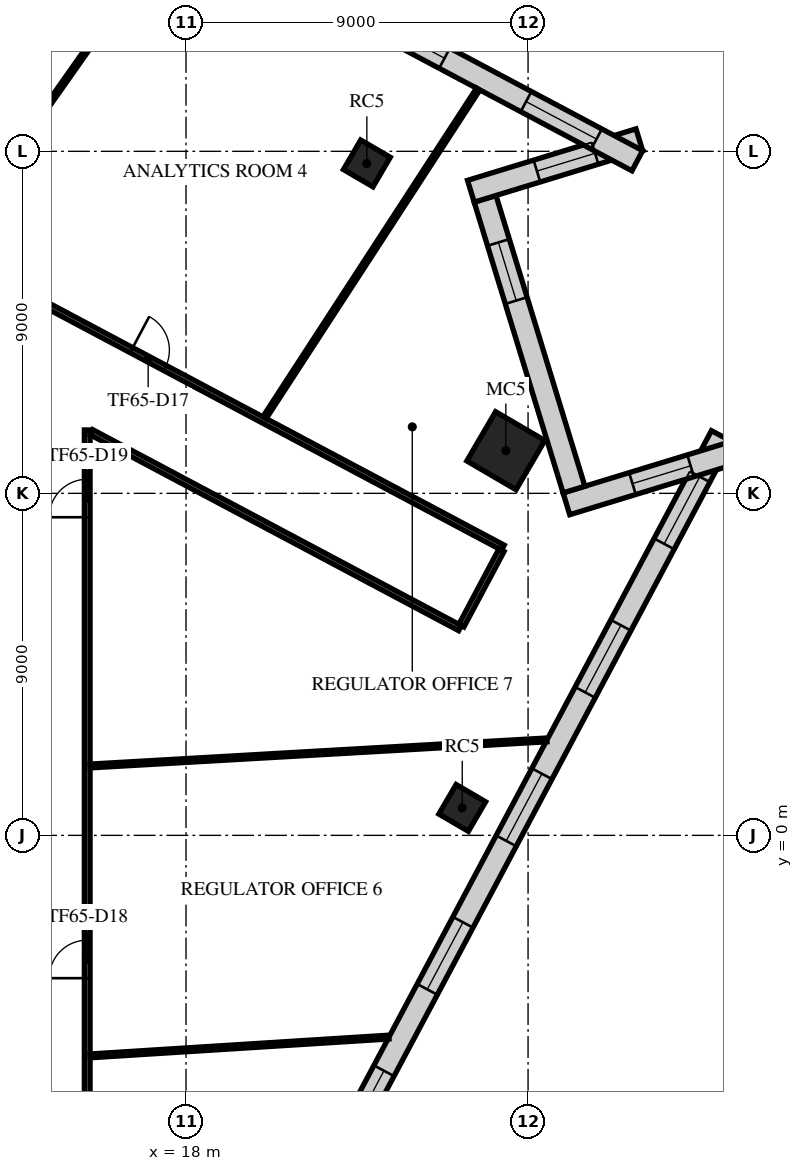
"""IFC4 building model, lengths in metres.
Left out: names, types, materials, properties, quantities, classifications, styles, units other than length and angle.
Written with IfcOpenShell. Run it as: python <this file> out.ifc"""

import sys

from ifc_helpers import new_model, si_unit, direction, frame, frame_2d, origin, origin_2d, place, context, subcontext, project, spatial, rectangle, extrude, element, fill, save


model = new_model("IFC4")
c1 = context("Model", 3, precision=1e-05, world=origin(), true_north=direction((0.0, 1.0)))
c2 = subcontext(c1, "Body", "Model", "MODEL_VIEW")
j1 = project(units=[si_unit("LENGTHUNIT", "METRE"), si_unit("PLANEANGLEUNIT", "RADIAN")], contexts=[c1])
p1 = place(None, origin())
s1 = spatial("IfcSite", under=j1, at=p1, CompositionType="ELEMENT")
p2 = place(p1, origin())
s2 = spatial("IfcBuilding", under=s1, at=p2, CompositionType="ELEMENT")
p3 = place(p2, frame((0.0, 0.0, 274.9)))
s3 = spatial("IfcBuildingStorey", under=s2, at=p3, CompositionType="ELEMENT", Elevation=274.9)
p4 = place(p3, frame((25.268, 0.722, 0.0), z_axis=(0.0, 0.0, 1.0), x_axis=(0.504643651291, 0.863327739165, 0.0)))
e1 = element("IfcColumn", 1, at=p4, inside=s3, PredefinedType="COLUMN", context=c2, shape_type="SweptSolid", body=[
    extrude(rectangle(XDim=0.9, YDim=0.9, at=origin_2d()), origin(), (0.0, 0.0, 1.0), 4.0),
])
p5 = place(p3, frame((26.415, 10.122, 0.0), z_axis=(0.0, 0.0, 1.0), x_axis=(0.504643651291, 0.863327739165, 0.0)))
e2 = element("IfcColumn", 2, at=p5, inside=s3, PredefinedType="COLUMN", context=c2, shape_type="SweptSolid", body=[
    extrude(rectangle(XDim=1.5, YDim=1.5, at=origin_2d()), origin(), (0.0, 0.0, 1.0), 4.0),
])
p6 = place(p3, frame((22.758, 17.682, 0.0), z_axis=(0.0, 0.0, 1.0), x_axis=(0.504643651291, 0.863327739165, 0.0)))
e3 = element("IfcColumn", 3, at=p6, inside=s3, PredefinedType="COLUMN", context=c2, shape_type="SweptSolid", body=[
    extrude(rectangle(XDim=0.9, YDim=0.9, at=origin_2d()), origin(), (0.0, 0.0, 1.0), 4.0),
])
p7 = place(p3, frame((9.233, -32.479, 0.0), z_axis=(0.0, 0.0, 1.0), x_axis=(0.469468429065, 0.882949259081, 0.0)))
e4 = element("IfcWall", 4, at=p7, inside=s3, PredefinedType="STANDARD", context=c2, shape_type="SweptSolid", body=[
    extrude(rectangle(XDim=48.686, YDim=0.6, at=frame_2d((24.343, 0.0))), origin(), (0.0, 0.0, 1.0), 3.64),
])
p8 = place(p7, frame((1.213, 0.0, 0.9)))
e5 = element("IfcOpeningElement", 5, at=p8, cuts=e4, PredefinedType="OPENING", context=c2, shape_type="SweptSolid", body=[
    extrude(rectangle(XDim=2.0, YDim=2.1, at=frame_2d((1.0, 1.05))), frame((0.0, 0.31, 0.0), z_axis=(0.0, -1.0, 0.0), x_axis=(1.0, 0.0, 0.0)), (0.0, 0.0, 1.0), 0.62),
])
p9 = place(p7, frame((5.639, 0.0, 0.9)))
e6 = element("IfcOpeningElement", 6, at=p9, cuts=e4, PredefinedType="OPENING", context=c2, shape_type="SweptSolid", body=[
    extrude(rectangle(XDim=2.0, YDim=2.1, at=frame_2d((1.0, 1.05))), frame((0.0, 0.31, 0.0), z_axis=(0.0, -1.0, 0.0), x_axis=(1.0, 0.0, 0.0)), (0.0, 0.0, 1.0), 0.62),
])
p10 = place(p7, frame((10.065, 0.0, 0.9)))
e7 = element("IfcOpeningElement", 7, at=p10, cuts=e4, PredefinedType="OPENING", context=c2, shape_type="SweptSolid", body=[
    extrude(rectangle(XDim=2.0, YDim=2.1, at=frame_2d((1.0, 1.05))), frame((0.0, 0.31, 0.0), z_axis=(0.0, -1.0, 0.0), x_axis=(1.0, 0.0, 0.0)), (0.0, 0.0, 1.0), 0.62),
])
p11 = place(p7, frame((14.491, 0.0, 0.9)))
e8 = element("IfcOpeningElement", 8, at=p11, cuts=e4, PredefinedType="OPENING", context=c2, shape_type="SweptSolid", body=[
    extrude(rectangle(XDim=2.0, YDim=2.1, at=frame_2d((1.0, 1.05))), frame((0.0, 0.31, 0.0), z_axis=(0.0, -1.0, 0.0), x_axis=(1.0, 0.0, 0.0)), (0.0, 0.0, 1.0), 0.62),
])
p12 = place(p7, frame((18.917, 0.0, 0.9)))
e9 = element("IfcOpeningElement", 9, at=p12, cuts=e4, PredefinedType="OPENING", context=c2, shape_type="SweptSolid", body=[
    extrude(rectangle(XDim=2.0, YDim=2.1, at=frame_2d((1.0, 1.05))), frame((0.0, 0.31, 0.0), z_axis=(0.0, -1.0, 0.0), x_axis=(1.0, 0.0, 0.0)), (0.0, 0.0, 1.0), 0.62),
])
p13 = place(p7, frame((23.343, 0.0, 0.9)))
e10 = element("IfcOpeningElement", 10, at=p13, cuts=e4, PredefinedType="OPENING", context=c2, shape_type="SweptSolid", body=[
    extrude(rectangle(XDim=2.0, YDim=2.1, at=frame_2d((1.0, 1.05))), frame((0.0, 0.31, 0.0), z_axis=(0.0, -1.0, 0.0), x_axis=(1.0, 0.0, 0.0)), (0.0, 0.0, 1.0), 0.62),
])
p14 = place(p7, frame((27.769, 0.0, 0.9)))
e11 = element("IfcOpeningElement", 11, at=p14, cuts=e4, PredefinedType="OPENING", context=c2, shape_type="SweptSolid", body=[
    extrude(rectangle(XDim=2.0, YDim=2.1, at=frame_2d((1.0, 1.05))), frame((0.0, 0.31, 0.0), z_axis=(0.0, -1.0, 0.0), x_axis=(1.0, 0.0, 0.0)), (0.0, 0.0, 1.0), 0.62),
])
p15 = place(p7, frame((32.195, 0.0, 0.9)))
e12 = element("IfcOpeningElement", 12, at=p15, cuts=e4, PredefinedType="OPENING", context=c2, shape_type="SweptSolid", body=[
    extrude(rectangle(XDim=2.0, YDim=2.1, at=frame_2d((1.0, 1.05))), frame((0.0, 0.31, 0.0), z_axis=(0.0, -1.0, 0.0), x_axis=(1.0, 0.0, 0.0)), (0.0, 0.0, 1.0), 0.62),
])
p16 = place(p7, frame((36.621, 0.0, 0.9)))
e13 = element("IfcOpeningElement", 13, at=p16, cuts=e4, PredefinedType="OPENING", context=c2, shape_type="SweptSolid", body=[
    extrude(rectangle(XDim=2.0, YDim=2.1, at=frame_2d((1.0, 1.05))), frame((0.0, 0.31, 0.0), z_axis=(0.0, -1.0, 0.0), x_axis=(1.0, 0.0, 0.0)), (0.0, 0.0, 1.0), 0.62),
])
p17 = place(p7, frame((41.047, 0.0, 0.9)))
e14 = element("IfcOpeningElement", 14, at=p17, cuts=e4, PredefinedType="OPENING", context=c2, shape_type="SweptSolid", body=[
    extrude(rectangle(XDim=2.0, YDim=2.1, at=frame_2d((1.0, 1.05))), frame((0.0, 0.31, 0.0), z_axis=(0.0, -1.0, 0.0), x_axis=(1.0, 0.0, 0.0)), (0.0, 0.0, 1.0), 0.62),
])
p18 = place(p7, frame((45.473, 0.0, 0.9)))
e15 = element("IfcOpeningElement", 15, at=p18, cuts=e4, PredefinedType="OPENING", context=c2, shape_type="SweptSolid", body=[
    extrude(rectangle(XDim=2.0, YDim=2.1, at=frame_2d((1.0, 1.05))), frame((0.0, 0.31, 0.0), z_axis=(0.0, -1.0, 0.0), x_axis=(1.0, 0.0, 0.0)), (0.0, 0.0, 1.0), 0.62),
])
p19 = place(p3, frame((32.442, 10.08, 0.0), z_axis=(0.0, 0.0, 1.0), x_axis=(-0.956306994041, -0.2923643842, 0.0)))
e16 = element("IfcWall", 16, at=p19, inside=s3, PredefinedType="STANDARD", context=c2, shape_type="SweptSolid", body=[
    extrude(rectangle(XDim=4.635, YDim=0.6, at=frame_2d((2.318, 0.0))), origin(), (0.0, 0.0, 1.0), 3.64),
])
p20 = place(p19, frame((1.218, 0.0, 0.9)))
e17 = element("IfcOpeningElement", 17, at=p20, cuts=e16, PredefinedType="OPENING", context=c2, shape_type="SweptSolid", body=[
    extrude(rectangle(XDim=1.6, YDim=2.1, at=frame_2d((0.8, 1.05))), frame((0.0, 0.31, 0.0), z_axis=(0.0, -1.0, 0.0), x_axis=(1.0, 0.0, 0.0)), (0.0, 0.0, 1.0), 0.62),
])
p21 = place(p3, frame((28.208, 9.1, 0.0), z_axis=(0.0, 0.0, 1.0), x_axis=(-0.292389102139, 0.956299436866, 0.0)))
e18 = element("IfcWall", 18, at=p21, inside=s3, PredefinedType="STANDARD", context=c2, shape_type="SweptSolid", body=[
    extrude(rectangle(XDim=8.0, YDim=0.6, at=frame_2d((4.0, 0.0))), origin(), (0.0, 0.0, 1.0), 3.64),
])
p22 = place(p21, frame((5.2, 0.0, 0.9)))
e19 = element("IfcOpeningElement", 19, at=p22, cuts=e18, PredefinedType="OPENING", context=c2, shape_type="SweptSolid", body=[
    extrude(rectangle(XDim=1.6, YDim=2.1, at=frame_2d((0.8, 1.05))), frame((0.0, 0.31, 0.0), z_axis=(0.0, -1.0, 0.0), x_axis=(1.0, 0.0, 0.0)), (0.0, 0.0, 1.0), 0.62),
])
p23 = place(p3, frame((25.495, 16.949, 0.0), z_axis=(0.0, 0.0, 1.0), x_axis=(0.956292267386, 0.292412549899, 0.0)))
e20 = element("IfcWall", 20, at=p23, inside=s3, PredefinedType="STANDARD", context=c2, shape_type="SweptSolid", body=[
    extrude(rectangle(XDim=4.635, YDim=0.6, at=frame_2d((2.318, 0.0))), origin(), (0.0, 0.0, 1.0), 3.64),
])
p24 = place(p23, frame((1.818, 0.0, 0.9)))
e21 = element("IfcOpeningElement", 21, at=p24, cuts=e20, PredefinedType="OPENING", context=c2, shape_type="SweptSolid", body=[
    extrude(rectangle(XDim=1.6, YDim=2.1, at=frame_2d((0.8, 1.05))), frame((0.0, 0.31, 0.0), z_axis=(0.0, -1.0, 0.0), x_axis=(1.0, 0.0, 0.0)), (0.0, 0.0, 1.0), 0.62),
])
p25 = place(p3, frame((29.875, 17.753, 0.0), z_axis=(0.0, 0.0, 1.0), x_axis=(-0.88294707281, 0.469472540854, 0.0)))
e22 = element("IfcWall", 22, at=p25, inside=s3, PredefinedType="STANDARD", context=c2, shape_type="SweptSolid", body=[
    extrude(rectangle(XDim=36.243, YDim=0.6, at=frame_2d((18.122, 0.0))), origin(), (0.0, 0.0, 1.0), 3.64),
])
p26 = place(p25, frame((1.215, 0.0, 0.9)))
e23 = element("IfcOpeningElement", 23, at=p26, cuts=e22, PredefinedType="OPENING", context=c2, shape_type="SweptSolid", body=[
    extrude(rectangle(XDim=2.1, YDim=2.1, at=frame_2d((1.05, 1.05))), frame((0.0, 0.31, 0.0), z_axis=(0.0, -1.0, 0.0), x_axis=(1.0, 0.0, 0.0)), (0.0, 0.0, 1.0), 0.62),
])
p27 = place(p25, frame((5.746, 0.0, 0.9)))
e24 = element("IfcOpeningElement", 24, at=p27, cuts=e22, PredefinedType="OPENING", context=c2, shape_type="SweptSolid", body=[
    extrude(rectangle(XDim=2.1, YDim=2.1, at=frame_2d((1.05, 1.05))), frame((0.0, 0.31, 0.0), z_axis=(0.0, -1.0, 0.0), x_axis=(1.0, 0.0, 0.0)), (0.0, 0.0, 1.0), 0.62),
])
p28 = place(p25, frame((10.276, 0.0, 0.9)))
e25 = element("IfcOpeningElement", 25, at=p28, cuts=e22, PredefinedType="OPENING", context=c2, shape_type="SweptSolid", body=[
    extrude(rectangle(XDim=2.1, YDim=2.1, at=frame_2d((1.05, 1.05))), frame((0.0, 0.31, 0.0), z_axis=(0.0, -1.0, 0.0), x_axis=(1.0, 0.0, 0.0)), (0.0, 0.0, 1.0), 0.62),
])
p29 = place(p25, frame((14.806, 0.0, 0.9)))
e26 = element("IfcOpeningElement", 26, at=p29, cuts=e22, PredefinedType="OPENING", context=c2, shape_type="SweptSolid", body=[
    extrude(rectangle(XDim=2.1, YDim=2.1, at=frame_2d((1.05, 1.05))), frame((0.0, 0.31, 0.0), z_axis=(0.0, -1.0, 0.0), x_axis=(1.0, 0.0, 0.0)), (0.0, 0.0, 1.0), 0.62),
])
p30 = place(p25, frame((19.337, 0.0, 0.9)))
e27 = element("IfcOpeningElement", 27, at=p30, cuts=e22, PredefinedType="OPENING", context=c2, shape_type="SweptSolid", body=[
    extrude(rectangle(XDim=2.1, YDim=2.1, at=frame_2d((1.05, 1.05))), frame((0.0, 0.31, 0.0), z_axis=(0.0, -1.0, 0.0), x_axis=(1.0, 0.0, 0.0)), (0.0, 0.0, 1.0), 0.62),
])
p31 = place(p25, frame((23.867, 0.0, 0.9)))
e28 = element("IfcOpeningElement", 28, at=p31, cuts=e22, PredefinedType="OPENING", context=c2, shape_type="SweptSolid", body=[
    extrude(rectangle(XDim=2.1, YDim=2.1, at=frame_2d((1.05, 1.05))), frame((0.0, 0.31, 0.0), z_axis=(0.0, -1.0, 0.0), x_axis=(1.0, 0.0, 0.0)), (0.0, 0.0, 1.0), 0.62),
])
p32 = place(p25, frame((28.398, 0.0, 0.9)))
e29 = element("IfcOpeningElement", 29, at=p32, cuts=e22, PredefinedType="OPENING", context=c2, shape_type="SweptSolid", body=[
    extrude(rectangle(XDim=2.1, YDim=2.1, at=frame_2d((1.05, 1.05))), frame((0.0, 0.31, 0.0), z_axis=(0.0, -1.0, 0.0), x_axis=(1.0, 0.0, 0.0)), (0.0, 0.0, 1.0), 0.62),
])
p33 = place(p25, frame((32.928, 0.0, 0.9)))
e30 = element("IfcOpeningElement", 30, at=p33, cuts=e22, PredefinedType="OPENING", context=c2, shape_type="SweptSolid", body=[
    extrude(rectangle(XDim=2.1, YDim=2.1, at=frame_2d((1.05, 1.05))), frame((0.0, 0.31, 0.0), z_axis=(0.0, -1.0, 0.0), x_axis=(1.0, 0.0, 0.0)), (0.0, 0.0, 1.0), 0.62),
])
p34 = place(p3, frame((-8.385, 26.033, 0.0), z_axis=(0.0, 0.0, 1.0), x_axis=(0.882949433839, -0.46946810039, 0.0)))
e31 = element("IfcWall", 31, at=p34, inside=s3, PredefinedType="PARTITIONING", context=c2, shape_type="SweptSolid", body=[
    extrude(rectangle(XDim=39.325, YDim=0.15, at=frame_2d((19.662, 0.0))), origin(), (0.0, 0.0, 1.0), 3.04),
])
p35 = place(p34, frame((10.622, 0.0, 0.0)))
e32 = element("IfcOpeningElement", 32, at=p35, cuts=e31, PredefinedType="OPENING", context=c2, shape_type="SweptSolid", body=[
    extrude(rectangle(XDim=1.0, YDim=2.1, at=frame_2d((0.5, 1.05))), frame((0.0, 0.085, 0.0), z_axis=(0.0, -1.0, 0.0), x_axis=(1.0, 0.0, 0.0)), (0.0, 0.0, 1.0), 0.17),
])
p36 = place(p34, frame((16.615, 0.0, 0.0)))
e33 = element("IfcOpeningElement", 33, at=p36, cuts=e31, PredefinedType="OPENING", context=c2, shape_type="SweptSolid", body=[
    extrude(rectangle(XDim=1.0, YDim=2.1, at=frame_2d((0.5, 1.05))), frame((0.0, 0.085, 0.0), z_axis=(0.0, -1.0, 0.0), x_axis=(1.0, 0.0, 0.0)), (0.0, 0.0, 1.0), 0.17),
])
p37 = place(p34, frame((28.254, 0.0, 0.0)))
e34 = element("IfcOpeningElement", 34, at=p37, cuts=e31, PredefinedType="OPENING", context=c2, shape_type="SweptSolid", body=[
    extrude(rectangle(XDim=1.0, YDim=2.1, at=frame_2d((0.5, 1.05))), frame((0.0, 0.085, 0.0), z_axis=(0.0, -1.0, 0.0), x_axis=(1.0, 0.0, 0.0)), (0.0, 0.0, 1.0), 0.17),
])
p38 = place(p3, frame((15.4, -15.325, 0.0), z_axis=(0.0, 0.0, 1.0), x_axis=(0.0, 1.0, 0.0)))
e35 = element("IfcWall", 35, at=p38, inside=s3, PredefinedType="PARTITIONING", context=c2, shape_type="SweptSolid", body=[
    extrude(rectangle(XDim=25.993, YDim=0.15, at=frame_2d((12.997, 0.0))), origin(), (0.0, 0.0, 1.0), 3.24),
])
p39 = place(p38, frame((0.8, 0.0, 0.0)))
e36 = element("IfcOpeningElement", 36, at=p39, cuts=e35, PredefinedType="OPENING", context=c2, shape_type="SweptSolid", body=[
    extrude(rectangle(XDim=1.8, YDim=2.1, at=frame_2d((0.9, 1.05))), frame((0.0, 0.085, 0.0), z_axis=(0.0, -1.0, 0.0), x_axis=(1.0, 0.0, 0.0)), (0.0, 0.0, 1.0), 0.17),
])
p40 = place(p38, frame((11.567, 0.0, 0.0)))
e37 = element("IfcOpeningElement", 37, at=p40, cuts=e35, PredefinedType="OPENING", context=c2, shape_type="SweptSolid", body=[
    extrude(rectangle(XDim=1.0, YDim=2.1, at=frame_2d((0.5, 1.05))), frame((0.0, 0.085, 0.0), z_axis=(0.0, -1.0, 0.0), x_axis=(1.0, 0.0, 0.0)), (0.0, 0.0, 1.0), 0.17),
])
p41 = place(p38, frame((23.696, 0.0, 0.0)))
e38 = element("IfcOpeningElement", 38, at=p41, cuts=e35, PredefinedType="OPENING", context=c2, shape_type="SweptSolid", body=[
    extrude(rectangle(XDim=1.0, YDim=2.1, at=frame_2d((0.5, 1.05))), frame((0.0, 0.085, 0.0), z_axis=(0.0, -1.0, 0.0), x_axis=(1.0, 0.0, 0.0)), (0.0, 0.0, 1.0), 0.17),
])
p42 = place(p3, frame((15.51, 10.609, 0.0), z_axis=(0.0, 0.0, 1.0), x_axis=(0.882945895242, -0.469474755525, 0.0)))
e39 = element("IfcWall", 39, at=p42, inside=s3, PredefinedType="PARTITIONING", context=c2, shape_type="SweptSolid", body=[
    extrude(rectangle(XDim=10.986, YDim=0.15, at=frame_2d((5.493, 0.0))), origin(), (0.0, 0.0, 1.0), 3.24),
])
p43 = place(p3, frame((25.245, 5.518, 0.0), z_axis=(0.0, 0.0, 1.0), x_axis=(0.469596777995, 0.882881003361, 0.0)))
e40 = element("IfcWall", 40, at=p43, inside=s3, PredefinedType="PARTITIONING", context=c2, shape_type="SweptSolid", body=[
    extrude(rectangle(XDim=2.25, YDim=0.15, at=frame_2d((1.125, 0.0))), origin(), (0.0, 0.0, 1.0), 3.04),
])
p44 = place(p3, frame((11.709, 15.441, 0.0), z_axis=(0.0, 0.0, 1.0), x_axis=(0.575721307139, 0.817645997058, 0.0)))
e41 = element("IfcWall", 41, at=p44, inside=s3, PredefinedType="PARTITIONING", context=c2, shape_type="SweptSolid", body=[
    extrude(rectangle(XDim=10.348, YDim=0.1, at=frame_2d((5.174, 0.0))), origin(), (0.0, 0.0, 1.0), 3.04),
])
p45 = place(p3, frame((15.478, -5.803, 0.0), z_axis=(0.0, 0.0, 1.0), x_axis=(0.9980255857, 0.062808680043, 0.0)))
e42 = element("IfcWall", 42, at=p45, inside=s3, PredefinedType="PARTITIONING", context=c2, shape_type="SweptSolid", body=[
    extrude(rectangle(XDim=7.875, YDim=0.1, at=frame_2d((3.938, 0.0))), origin(), (0.0, 0.0, 1.0), 3.04),
])
p46 = place(p3, frame((15.478, 1.825, 0.0), z_axis=(0.0, 0.0, 1.0), x_axis=(0.998373479071, 0.057012246819, 0.0)))
e43 = element("IfcWall", 43, at=p46, inside=s3, PredefinedType="PARTITIONING", context=c2, shape_type="SweptSolid", body=[
    extrude(rectangle(XDim=12.037, YDim=0.1, at=frame_2d((6.019, 0.0))), origin(), (0.0, 0.0, 1.0), 3.04),
])
p47 = place(p3, frame((20.067, 10.995, 0.0), z_axis=(0.0, 0.0, 1.0), x_axis=(0.545104885897, 0.838367856834, 0.0)))
e44 = element("IfcWall", 44, at=p47, inside=s3, PredefinedType="PARTITIONING", context=c2, shape_type="SweptSolid", body=[
    extrude(rectangle(XDim=10.309, YDim=0.1, at=frame_2d((5.154, 0.0))), origin(), (0.0, 0.0, 1.0), 3.04),
])
p48 = place(p14, origin())
e45 = element("IfcWindow", 45, at=p48, inside=s3, PartitioningType="SINGLE_PANEL", PredefinedType="WINDOW", context=c2, shape_type="SweptSolid", body=[
    extrude(rectangle(XDim=2.0, YDim=2.1, at=frame_2d((1.0, 1.05))), frame((0.0, 0.03, 0.0), z_axis=(0.0, -1.0, 0.0), x_axis=(1.0, 0.0, 0.0)), (0.0, 0.0, 1.0), 0.06),
])
fill(e11, e45)
p49 = place(p15, origin())
e46 = element("IfcWindow", 46, at=p49, inside=s3, PartitioningType="SINGLE_PANEL", PredefinedType="WINDOW", context=c2, shape_type="SweptSolid", body=[
    extrude(rectangle(XDim=2.0, YDim=2.1, at=frame_2d((1.0, 1.05))), frame((0.0, 0.03, 0.0), z_axis=(0.0, -1.0, 0.0), x_axis=(1.0, 0.0, 0.0)), (0.0, 0.0, 1.0), 0.06),
])
fill(e12, e46)
p50 = place(p16, origin())
e47 = element("IfcWindow", 47, at=p50, inside=s3, PartitioningType="SINGLE_PANEL", PredefinedType="WINDOW", context=c2, shape_type="SweptSolid", body=[
    extrude(rectangle(XDim=2.0, YDim=2.1, at=frame_2d((1.0, 1.05))), frame((0.0, 0.03, 0.0), z_axis=(0.0, -1.0, 0.0), x_axis=(1.0, 0.0, 0.0)), (0.0, 0.0, 1.0), 0.06),
])
fill(e13, e47)
p51 = place(p17, origin())
e48 = element("IfcWindow", 48, at=p51, inside=s3, PartitioningType="SINGLE_PANEL", PredefinedType="WINDOW", context=c2, shape_type="SweptSolid", body=[
    extrude(rectangle(XDim=2.0, YDim=2.1, at=frame_2d((1.0, 1.05))), frame((0.0, 0.03, 0.0), z_axis=(0.0, -1.0, 0.0), x_axis=(1.0, 0.0, 0.0)), (0.0, 0.0, 1.0), 0.06),
])
fill(e14, e48)
p52 = place(p18, origin())
e49 = element("IfcWindow", 49, at=p52, inside=s3, PartitioningType="SINGLE_PANEL", PredefinedType="WINDOW", context=c2, shape_type="SweptSolid", body=[
    extrude(rectangle(XDim=2.0, YDim=2.1, at=frame_2d((1.0, 1.05))), frame((0.0, 0.03, 0.0), z_axis=(0.0, -1.0, 0.0), x_axis=(1.0, 0.0, 0.0)), (0.0, 0.0, 1.0), 0.06),
])
fill(e15, e49)
p53 = place(p20, origin())
e50 = element("IfcWindow", 50, at=p53, inside=s3, PartitioningType="SINGLE_PANEL", PredefinedType="WINDOW", context=c2, shape_type="SweptSolid", body=[
    extrude(rectangle(XDim=1.6, YDim=2.1, at=frame_2d((0.8, 1.05))), frame((0.0, 0.03, 0.0), z_axis=(0.0, -1.0, 0.0), x_axis=(1.0, 0.0, 0.0)), (0.0, 0.0, 1.0), 0.06),
])
fill(e17, e50)
p54 = place(p22, origin())
e51 = element("IfcWindow", 51, at=p54, inside=s3, PartitioningType="SINGLE_PANEL", PredefinedType="WINDOW", context=c2, shape_type="SweptSolid", body=[
    extrude(rectangle(XDim=1.6, YDim=2.1, at=frame_2d((0.8, 1.05))), frame((0.0, 0.03, 0.0), z_axis=(0.0, -1.0, 0.0), x_axis=(1.0, 0.0, 0.0)), (0.0, 0.0, 1.0), 0.06),
])
fill(e19, e51)
p55 = place(p24, origin())
e52 = element("IfcWindow", 52, at=p55, inside=s3, PartitioningType="SINGLE_PANEL", PredefinedType="WINDOW", context=c2, shape_type="SweptSolid", body=[
    extrude(rectangle(XDim=1.6, YDim=2.1, at=frame_2d((0.8, 1.05))), frame((0.0, 0.03, 0.0), z_axis=(0.0, -1.0, 0.0), x_axis=(1.0, 0.0, 0.0)), (0.0, 0.0, 1.0), 0.06),
])
fill(e21, e52)
p56 = place(p26, origin())
e53 = element("IfcWindow", 53, at=p56, inside=s3, PartitioningType="SINGLE_PANEL", PredefinedType="WINDOW", context=c2, shape_type="SweptSolid", body=[
    extrude(rectangle(XDim=2.1, YDim=2.1, at=frame_2d((1.05, 1.05))), frame((0.0, 0.03, 0.0), z_axis=(0.0, -1.0, 0.0), x_axis=(1.0, 0.0, 0.0)), (0.0, 0.0, 1.0), 0.06),
])
fill(e23, e53)
p57 = place(p27, origin())
e54 = element("IfcWindow", 54, at=p57, inside=s3, PartitioningType="SINGLE_PANEL", PredefinedType="WINDOW", context=c2, shape_type="SweptSolid", body=[
    extrude(rectangle(XDim=2.1, YDim=2.1, at=frame_2d((1.05, 1.05))), frame((0.0, 0.03, 0.0), z_axis=(0.0, -1.0, 0.0), x_axis=(1.0, 0.0, 0.0)), (0.0, 0.0, 1.0), 0.06),
])
fill(e24, e54)
p58 = place(p37, origin())
e55 = element("IfcDoor", 55, at=p58, inside=s3, OperationType="SINGLE_SWING_RIGHT", PredefinedType="DOOR", context=c2, shape_type="SweptSolid", body=[
    extrude(rectangle(XDim=1.0, YDim=2.1, at=frame_2d((0.5, 1.05))), frame((0.0, 0.025, 0.0), z_axis=(0.0, -1.0, 0.0), x_axis=(1.0, 0.0, 0.0)), (0.0, 0.0, 1.0), 0.05),
])
fill(e34, e55)
p59 = place(p40, frame((1.0, 0.0, 0.0), z_axis=(0.0, 0.0, 1.0), x_axis=(-1.0, 0.0, 0.0)))
e56 = element("IfcDoor", 56, at=p59, inside=s3, OperationType="SINGLE_SWING_RIGHT", PredefinedType="DOOR", context=c2, shape_type="SweptSolid", body=[
    extrude(rectangle(XDim=1.0, YDim=2.1, at=frame_2d((0.5, 1.05))), frame((0.0, 0.025, 0.0), z_axis=(0.0, -1.0, 0.0), x_axis=(1.0, 0.0, 0.0)), (0.0, 0.0, 1.0), 0.05),
])
fill(e37, e56)
p60 = place(p41, frame((1.0, 0.0, 0.0), z_axis=(0.0, 0.0, 1.0), x_axis=(-1.0, 0.0, 0.0)))
e57 = element("IfcDoor", 57, at=p60, inside=s3, OperationType="SINGLE_SWING_LEFT", PredefinedType="DOOR", context=c2, shape_type="SweptSolid", body=[
    extrude(rectangle(XDim=1.0, YDim=2.1, at=frame_2d((0.5, 1.05))), frame((0.0, 0.025, 0.0), z_axis=(0.0, -1.0, 0.0), x_axis=(1.0, 0.0, 0.0)), (0.0, 0.0, 1.0), 0.05),
])
fill(e38, e57)
save(model, sys.argv[1])
